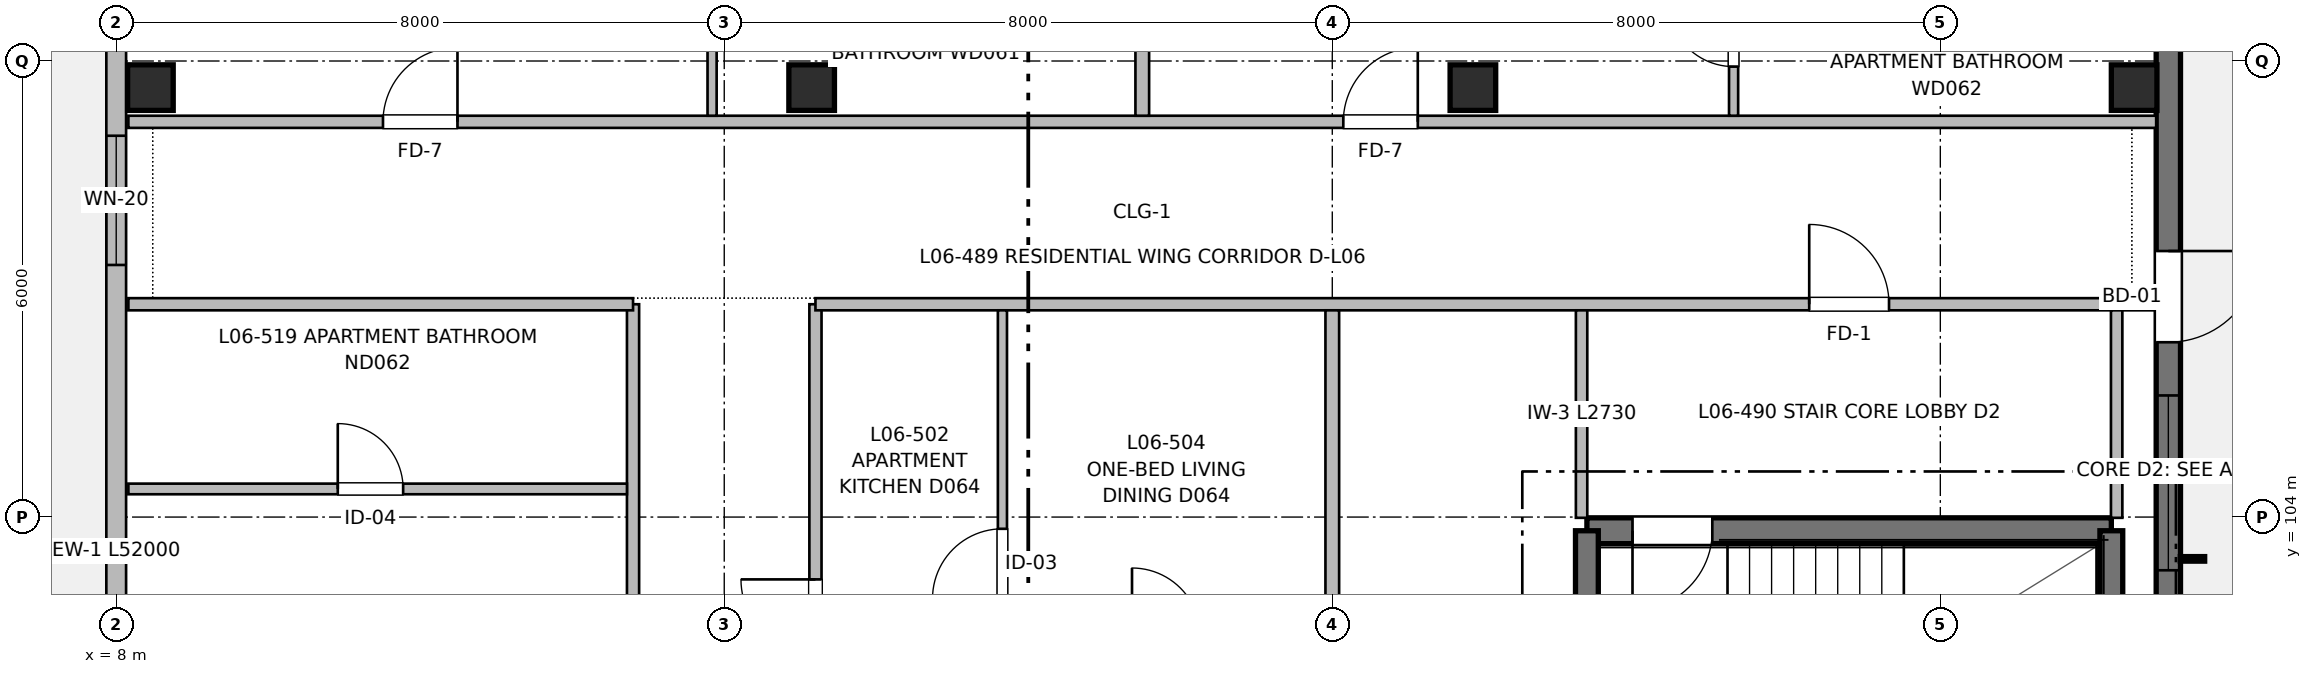
"""IFC4 building model, lengths in metres.
Left out: names, types, materials, properties, quantities, classifications, styles, units other than length and angle.
Written with IfcOpenShell. Run it as: python <this file> out.ifc"""

import sys

from ifc_helpers import new_model, si_unit, direction, frame, frame_2d, origin, origin_2d, place, context, subcontext, project, spatial, rectangle, extrude, element, fill, save


model = new_model("IFC4")
c1 = context("Model", 3, precision=1e-05, world=origin(), true_north=direction((0.0, 1.0)))
c2 = subcontext(c1, "Body", "Model", "MODEL_VIEW")
j1 = project(units=[si_unit("LENGTHUNIT", "METRE"), si_unit("PLANEANGLEUNIT", "RADIAN")], contexts=[c1])
p1 = place(None, origin())
s1 = spatial("IfcSite", under=j1, at=p1, CompositionType="ELEMENT")
p2 = place(p1, origin())
s2 = spatial("IfcBuilding", under=s1, at=p2, CompositionType="ELEMENT")
p3 = place(p2, frame((0.0, 0.0, 20.16)))
s3 = spatial("IfcBuildingStorey", under=s2, at=p3, CompositionType="ELEMENT", Elevation=20.16)
for number, where, z_axis, x_axis in (
    (1, (8.45, 109.65, 0.0), (0.0, 0.0, 1.0), (1.0, 0.0, 0.0)),
    (2, (17.15, 109.65, 0.0), (0.0, 0.0, 1.0), (1.0, 0.0, 0.0)),
    (3, (25.85, 109.65, 0.0), (0.0, 0.0, 1.0), (1.0, 0.0, 0.0)),
    (4, (34.55, 109.65, 0.0), (0.0, 0.0, 1.0), (1.0, 0.0, 0.0)),
):
    element("IfcColumn", number, at=place(p3, frame(where, z_axis=z_axis, x_axis=x_axis)), inside=s3, PredefinedType="COLUMN", context=c2, shape_type="SweptSolid", body=[
        extrude(rectangle(XDim=0.6, YDim=0.6, at=origin_2d()), origin(), (0.0, 0.0, 1.0), 3.2),
    ])
p4 = place(p3, frame((34.25, 103.82, 0.0), z_axis=(0.0, 0.0, 1.0), x_axis=(-1.0, 0.0, 0.0)))
e5 = element("IfcWall", 5, at=p4, inside=s3, PredefinedType="SHEAR", context=c2, shape_type="SweptSolid", body=[
    extrude(rectangle(XDim=6.9, YDim=0.34, at=frame_2d((3.45, 0.0))), origin(), (0.0, 0.0, 1.0), 3.2),
])
p5 = place(p4, frame((5.25, 0.0, 0.0)))
e6 = element("IfcOpeningElement", 6, at=p5, cuts=e5, PredefinedType="OPENING", context=c2, shape_type="SweptSolid", body=[
    extrude(rectangle(XDim=1.05, YDim=2.15, at=frame_2d((0.525, 1.075))), frame((0.0, 0.18, 0.0), z_axis=(0.0, -1.0, 0.0), x_axis=(1.0, 0.0, 0.0)), (0.0, 0.0, 1.0), 0.36),
])
for number, where, z_axis, x_axis in (
    (7, (27.35, 103.82, 0.0), (0.0, 0.0, 1.0), (0.0, -1.0, 0.0)),
    (8, (34.25, 100.45, 0.0), (0.0, 0.0, 1.0), (0.0, 1.0, 0.0)),
):
    element("IfcWall", number, at=place(p3, frame(where, z_axis=z_axis, x_axis=x_axis)), inside=s3, PredefinedType="SHEAR", context=c2, shape_type="SweptSolid", body=[
        extrude(rectangle(XDim=3.37, YDim=0.3, at=frame_2d((1.685, 0.0))), origin(), (0.0, 0.0, 1.0), 3.2),
    ])
p6 = place(p3, frame((35.0, 113.8, 0.0), z_axis=(0.0, 0.0, 1.0), x_axis=(0.0, -1.0, 0.0)))
e9 = element("IfcWall", 9, at=p6, inside=s3, PredefinedType="SHEAR", context=c2, shape_type="SweptSolid", body=[
    extrude(rectangle(XDim=13.8, YDim=0.32, at=frame_2d((6.9, 0.0))), origin(), (0.0, 0.0, 1.0), 2.98),
])
p7 = place(p6, frame((6.3, 0.0, 0.0)))
e10 = element("IfcOpeningElement", 10, at=p7, cuts=e9, PredefinedType="OPENING", context=c2, shape_type="SweptSolid", body=[
    extrude(rectangle(XDim=1.2, YDim=2.2, at=frame_2d((0.6, 1.1))), frame((0.0, 0.17, 0.0), z_axis=(0.0, -1.0, 0.0), x_axis=(1.0, 0.0, 0.0)), (0.0, 0.0, 1.0), 0.34),
])
p8 = place(p6, frame((8.2, 0.0, 0.57)))
e11 = element("IfcOpeningElement", 11, at=p8, cuts=e9, PredefinedType="OPENING", context=c2, shape_type="SweptSolid", body=[
    extrude(rectangle(XDim=2.3, YDim=1.65, at=frame_2d((1.15, 0.825))), frame((0.0, 0.17, 0.0), z_axis=(0.0, -1.0, 0.0), x_axis=(1.0, 0.0, 0.0)), (0.0, 0.0, 1.0), 0.34),
])
p9 = place(p3, frame((8.0, 61.8, 0.0), z_axis=(0.0, 0.0, 1.0), x_axis=(0.0, 1.0, 0.0)))
e12 = element("IfcWall", 12, at=p9, inside=s3, PredefinedType="SOLIDWALL", context=c2, shape_type="SweptSolid", body=[
    extrude(rectangle(XDim=52.0, YDim=0.26, at=frame_2d((26.0, 0.0))), origin(), (0.0, 0.0, 1.0), 2.98),
])
p10 = place(p9, frame((3.283, 0.0, 0.0)))
e13 = element("IfcOpeningElement", 13, at=p10, cuts=e12, PredefinedType="OPENING", context=c2, shape_type="SweptSolid", body=[
    extrude(rectangle(XDim=1.2, YDim=2.2, at=frame_2d((0.6, 1.1))), frame((0.0, 0.14, 0.0), z_axis=(0.0, -1.0, 0.0), x_axis=(1.0, 0.0, 0.0)), (0.0, 0.0, 1.0), 0.28),
])
p11 = place(p9, frame((6.083, 0.0, 0.57)))
e14 = element("IfcOpeningElement", 14, at=p11, cuts=e12, PredefinedType="OPENING", context=c2, shape_type="SweptSolid", body=[
    extrude(rectangle(XDim=2.3, YDim=1.65, at=frame_2d((1.15, 0.825))), frame((0.0, 0.14, 0.0), z_axis=(0.0, -1.0, 0.0), x_axis=(1.0, 0.0, 0.0)), (0.0, 0.0, 1.0), 0.28),
])
p12 = place(p9, frame((12.85, 0.0, 0.9)))
e15 = element("IfcOpeningElement", 15, at=p12, cuts=e12, PredefinedType="OPENING", context=c2, shape_type="SweptSolid", body=[
    extrude(rectangle(XDim=1.2, YDim=1.05, at=frame_2d((0.6, 0.525))), frame((0.0, 0.14, 0.0), z_axis=(0.0, -1.0, 0.0), x_axis=(1.0, 0.0, 0.0)), (0.0, 0.0, 1.0), 0.28),
])
p13 = place(p9, frame((21.342, 0.0, 0.9)))
e16 = element("IfcOpeningElement", 16, at=p13, cuts=e12, PredefinedType="OPENING", context=c2, shape_type="SweptSolid", body=[
    extrude(rectangle(XDim=0.65, YDim=0.95, at=frame_2d((0.325, 0.475))), frame((0.0, 0.14, 0.0), z_axis=(0.0, -1.0, 0.0), x_axis=(1.0, 0.0, 0.0)), (0.0, 0.0, 1.0), 0.28),
])
p14 = place(p9, frame((29.333, 0.0, 0.62)))
e17 = element("IfcOpeningElement", 17, at=p14, cuts=e12, PredefinedType="OPENING", context=c2, shape_type="SweptSolid", body=[
    extrude(rectangle(XDim=1.1, YDim=1.6, at=frame_2d((0.55, 0.8))), frame((0.0, 0.14, 0.0), z_axis=(0.0, -1.0, 0.0), x_axis=(1.0, 0.0, 0.0)), (0.0, 0.0, 1.0), 0.28),
])
p15 = place(p9, frame((35.3, 0.0, 0.47)))
e18 = element("IfcOpeningElement", 18, at=p15, cuts=e12, PredefinedType="OPENING", context=c2, shape_type="SweptSolid", body=[
    extrude(rectangle(XDim=2.7, YDim=1.75, at=frame_2d((1.35, 0.875))), frame((0.0, 0.14, 0.0), z_axis=(0.0, -1.0, 0.0), x_axis=(1.0, 0.0, 0.0)), (0.0, 0.0, 1.0), 0.28),
])
p16 = place(p9, frame((45.517, 0.0, 0.72)))
e19 = element("IfcOpeningElement", 19, at=p16, cuts=e12, PredefinedType="OPENING", context=c2, shape_type="SweptSolid", body=[
    extrude(rectangle(XDim=1.7, YDim=1.5, at=frame_2d((0.85, 0.75))), frame((0.0, 0.14, 0.0), z_axis=(0.0, -1.0, 0.0), x_axis=(1.0, 0.0, 0.0)), (0.0, 0.0, 1.0), 0.28),
])
p17 = place(p3, frame((14.8, 61.96, 0.0), z_axis=(0.0, 0.0, 1.0), x_axis=(0.0, 1.0, 0.0)))
e20 = element("IfcWall", 20, at=p17, inside=s3, PredefinedType="PARTITIONING", context=c2, shape_type="SweptSolid", body=[
    extrude(rectangle(XDim=44.84, YDim=0.16, at=frame_2d((22.42, 0.0))), origin(), (0.0, 0.0, 1.0), 2.935),
])
p18 = place(p17, frame((7.04, 0.0, 0.0)))
e21 = element("IfcOpeningElement", 21, at=p18, cuts=e20, PredefinedType="OPENING", context=c2, shape_type="SweptSolid", body=[
    extrude(rectangle(XDim=1.1, YDim=2.15, at=frame_2d((0.55, 1.075))), frame((0.0, 0.09, 0.0), z_axis=(0.0, -1.0, 0.0), x_axis=(1.0, 0.0, 0.0)), (0.0, 0.0, 1.0), 0.18),
])
p19 = place(p17, frame((13.44, 0.0, 0.0)))
e22 = element("IfcOpeningElement", 22, at=p19, cuts=e20, PredefinedType="OPENING", context=c2, shape_type="SweptSolid", body=[
    extrude(rectangle(XDim=1.6, YDim=2.15, at=frame_2d((0.8, 1.075))), frame((0.0, 0.09, 0.0), z_axis=(0.0, -1.0, 0.0), x_axis=(1.0, 0.0, 0.0)), (0.0, 0.0, 1.0), 0.18),
])
p20 = place(p17, frame((3.0, 0.0, 0.0)))
e23 = element("IfcOpeningElement", 23, at=p20, cuts=e20, PredefinedType="OPENING", context=c2, shape_type="SweptSolid", body=[
    extrude(rectangle(XDim=0.96, YDim=2.15, at=frame_2d((0.48, 1.075))), frame((0.0, 0.09, 0.0), z_axis=(0.0, -1.0, 0.0), x_axis=(1.0, 0.0, 0.0)), (0.0, 0.0, 1.0), 0.18),
])
p21 = place(p17, frame((27.045, 0.0, 0.0)))
e24 = element("IfcOpeningElement", 24, at=p21, cuts=e20, PredefinedType="OPENING", context=c2, shape_type="SweptSolid", body=[
    extrude(rectangle(XDim=0.98, YDim=2.15, at=frame_2d((0.49, 1.075))), frame((0.0, 0.09, 0.0), z_axis=(0.0, -1.0, 0.0), x_axis=(1.0, 0.0, 0.0)), (0.0, 0.0, 1.0), 0.18),
])
p22 = place(p17, frame((34.855, 0.0, 0.0)))
e25 = element("IfcOpeningElement", 25, at=p22, cuts=e20, PredefinedType="OPENING", context=c2, shape_type="SweptSolid", body=[
    extrude(rectangle(XDim=0.98, YDim=2.15, at=frame_2d((0.49, 1.075))), frame((0.0, 0.09, 0.0), z_axis=(0.0, -1.0, 0.0), x_axis=(1.0, 0.0, 0.0)), (0.0, 0.0, 1.0), 0.18),
])
p23 = place(p3, frame((17.2, 61.96, 0.0), z_axis=(0.0, 0.0, 1.0), x_axis=(0.0, 1.0, 0.0)))
e26 = element("IfcWall", 26, at=p23, inside=s3, PredefinedType="PARTITIONING", context=c2, shape_type="SweptSolid", body=[
    extrude(rectangle(XDim=44.84, YDim=0.16, at=frame_2d((22.42, 0.0))), origin(), (0.0, 0.0, 1.0), 2.935),
])
p24 = place(p23, frame((4.575, 0.0, 0.0)))
e27 = element("IfcOpeningElement", 27, at=p24, cuts=e26, PredefinedType="OPENING", context=c2, shape_type="SweptSolid", body=[
    extrude(rectangle(XDim=1.5, YDim=2.2, at=frame_2d((0.75, 1.1))), frame((0.0, 0.09, 0.0), z_axis=(0.0, -1.0, 0.0), x_axis=(1.0, 0.0, 0.0)), (0.0, 0.0, 1.0), 0.18),
])
p25 = place(p23, frame((17.27, 0.0, 0.0)))
e28 = element("IfcOpeningElement", 28, at=p25, cuts=e26, PredefinedType="OPENING", context=c2, shape_type="SweptSolid", body=[
    extrude(rectangle(XDim=0.98, YDim=2.15, at=frame_2d((0.49, 1.075))), frame((0.0, 0.09, 0.0), z_axis=(0.0, -1.0, 0.0), x_axis=(1.0, 0.0, 0.0)), (0.0, 0.0, 1.0), 0.18),
])
p26 = place(p23, frame((29.39, 0.0, 0.0)))
e29 = element("IfcOpeningElement", 29, at=p26, cuts=e26, PredefinedType="OPENING", context=c2, shape_type="SweptSolid", body=[
    extrude(rectangle(XDim=0.98, YDim=2.15, at=frame_2d((0.49, 1.075))), frame((0.0, 0.09, 0.0), z_axis=(0.0, -1.0, 0.0), x_axis=(1.0, 0.0, 0.0)), (0.0, 0.0, 1.0), 0.18),
])
p27 = place(p23, frame((40.24, 0.0, 0.0)))
e30 = element("IfcOpeningElement", 30, at=p27, cuts=e26, PredefinedType="OPENING", context=c2, shape_type="SweptSolid", body=[
    extrude(rectangle(XDim=0.98, YDim=2.15, at=frame_2d((0.49, 1.075))), frame((0.0, 0.09, 0.0), z_axis=(0.0, -1.0, 0.0), x_axis=(1.0, 0.0, 0.0)), (0.0, 0.0, 1.0), 0.18),
])
p28 = place(p3, frame((8.16, 106.8, 0.0), z_axis=(0.0, 0.0, 1.0), x_axis=(1.0, 0.0, 0.0)))
e31 = element("IfcWall", 31, at=p28, inside=s3, PredefinedType="PARTITIONING", context=c2, shape_type="SweptSolid", body=[
    extrude(rectangle(XDim=6.64, YDim=0.16, at=frame_2d((3.32, 0.0))), origin(), (0.0, 0.0, 1.0), 2.935),
])
p29 = place(p3, frame((17.2, 106.8, 0.0), z_axis=(0.0, 0.0, 1.0), x_axis=(1.0, 0.0, 0.0)))
e32 = element("IfcWall", 32, at=p29, inside=s3, PredefinedType="PARTITIONING", context=c2, shape_type="SweptSolid", body=[
    extrude(rectangle(XDim=17.64, YDim=0.16, at=frame_2d((8.82, 0.0))), origin(), (0.0, 0.0, 1.0), 2.935),
])
p30 = place(p29, frame((13.075, 0.0, 0.0)))
e33 = element("IfcOpeningElement", 33, at=p30, cuts=e32, PredefinedType="OPENING", context=c2, shape_type="SweptSolid", body=[
    extrude(rectangle(XDim=1.05, YDim=2.15, at=frame_2d((0.525, 1.075))), frame((0.0, 0.09, 0.0), z_axis=(0.0, -1.0, 0.0), x_axis=(1.0, 0.0, 0.0)), (0.0, 0.0, 1.0), 0.18),
])
p31 = place(p3, frame((8.16, 109.2, 0.0), z_axis=(0.0, 0.0, 1.0), x_axis=(1.0, 0.0, 0.0)))
e34 = element("IfcWall", 34, at=p31, inside=s3, PredefinedType="PARTITIONING", context=c2, shape_type="SweptSolid", body=[
    extrude(rectangle(XDim=26.68, YDim=0.16, at=frame_2d((13.34, 0.0))), origin(), (0.0, 0.0, 1.0), 2.935),
])
p32 = place(p31, frame((3.35, 0.0, 0.0)))
e35 = element("IfcOpeningElement", 35, at=p32, cuts=e34, PredefinedType="OPENING", context=c2, shape_type="SweptSolid", body=[
    extrude(rectangle(XDim=0.98, YDim=2.15, at=frame_2d((0.49, 1.075))), frame((0.0, 0.09, 0.0), z_axis=(0.0, -1.0, 0.0), x_axis=(1.0, 0.0, 0.0)), (0.0, 0.0, 1.0), 0.18),
])
p33 = place(p31, frame((15.985, 0.0, 0.0)))
e36 = element("IfcOpeningElement", 36, at=p33, cuts=e34, PredefinedType="OPENING", context=c2, shape_type="SweptSolid", body=[
    extrude(rectangle(XDim=0.98, YDim=2.15, at=frame_2d((0.49, 1.075))), frame((0.0, 0.09, 0.0), z_axis=(0.0, -1.0, 0.0), x_axis=(1.0, 0.0, 0.0)), (0.0, 0.0, 1.0), 0.18),
])
p34 = place(p3, frame((24.0, 100.05, 0.0), z_axis=(0.0, 0.0, 1.0), x_axis=(0.0, 1.0, 0.0)))
e37 = element("IfcWall", 37, at=p34, inside=s3, PredefinedType="PARTITIONING", context=c2, shape_type="SweptSolid", body=[
    extrude(rectangle(XDim=6.67, YDim=0.18, at=frame_2d((3.335, 0.0))), origin(), (0.0, 0.0, 1.0), 2.935),
])
for number, where, z_axis, x_axis in (
    (38, (27.28, 103.99, 0.0), (0.0, 0.0, 1.0), (0.0, 1.0, 0.0)),
    (39, (34.32, 103.99, 0.0), (0.0, 0.0, 1.0), (0.0, 1.0, 0.0)),
):
    element("IfcWall", number, at=place(p3, frame(where, z_axis=z_axis, x_axis=x_axis)), inside=s3, PredefinedType="PARTITIONING", context=c2, shape_type="SweptSolid", body=[
        extrude(rectangle(XDim=2.73, YDim=0.15, at=frame_2d((1.365, 0.0))), origin(), (0.0, 0.0, 1.0), 2.935),
    ])
p35 = place(p3, frame((19.66, 96.96, 0.0), z_axis=(0.0, 0.0, 1.0), x_axis=(0.0, 1.0, 0.0)))
e40 = element("IfcWall", 40, at=p35, inside=s3, PredefinedType="PARTITIONING", context=c2, shape_type="SweptSolid", body=[
    extrude(rectangle(XDim=9.76, YDim=0.12, at=frame_2d((4.88, 0.0))), origin(), (0.0, 0.0, 1.0), 2.935),
])
p36 = place(p35, frame((1.706, 0.0, 0.0)))
e41 = element("IfcOpeningElement", 41, at=p36, cuts=e40, PredefinedType="OPENING", context=c2, shape_type="SweptSolid", body=[
    extrude(rectangle(XDim=0.86, YDim=2.1, at=frame_2d((0.43, 1.05))), frame((0.0, 0.07, 0.0), z_axis=(0.0, -1.0, 0.0), x_axis=(1.0, 0.0, 0.0)), (0.0, 0.0, 1.0), 0.14),
])
p37 = place(p35, frame((5.966, 0.0, 0.0)))
e42 = element("IfcOpeningElement", 42, at=p37, cuts=e40, PredefinedType="OPENING", context=c2, shape_type="SweptSolid", body=[
    extrude(rectangle(XDim=0.92, YDim=2.1, at=frame_2d((0.46, 1.05))), frame((0.0, 0.07, 0.0), z_axis=(0.0, -1.0, 0.0), x_axis=(1.0, 0.0, 0.0)), (0.0, 0.0, 1.0), 0.14),
])
p38 = place(p3, frame((21.5, 109.28, 0.0), z_axis=(0.0, 0.0, 1.0), x_axis=(0.0, 1.0, 0.0)))
e43 = element("IfcWall", 43, at=p38, inside=s3, PredefinedType="PARTITIONING", context=c2, shape_type="SweptSolid", body=[
    extrude(rectangle(XDim=4.39, YDim=0.18, at=frame_2d((2.195, 0.0))), origin(), (0.0, 0.0, 1.0), 2.935),
])
p39 = place(p3, frame((15.84, 109.28, 0.0), z_axis=(0.0, 0.0, 1.0), x_axis=(0.0, 1.0, 0.0)))
e44 = element("IfcWall", 44, at=p39, inside=s3, PredefinedType="PARTITIONING", context=c2, shape_type="SweptSolid", body=[
    extrude(rectangle(XDim=4.39, YDim=0.12, at=frame_2d((2.195, 0.0))), origin(), (0.0, 0.0, 1.0), 2.935),
])
p40 = place(p39, frame((2.296, 0.0, 0.0)))
e45 = element("IfcOpeningElement", 45, at=p40, cuts=e44, PredefinedType="OPENING", context=c2, shape_type="SweptSolid", body=[
    extrude(rectangle(XDim=0.86, YDim=2.1, at=frame_2d((0.43, 1.05))), frame((0.0, 0.07, 0.0), z_axis=(0.0, -1.0, 0.0), x_axis=(1.0, 0.0, 0.0)), (0.0, 0.0, 1.0), 0.14),
])
p41 = place(p3, frame((29.28, 109.28, 0.0), z_axis=(0.0, 0.0, 1.0), x_axis=(0.0, 1.0, 0.0)))
e46 = element("IfcWall", 46, at=p41, inside=s3, PredefinedType="PARTITIONING", context=c2, shape_type="SweptSolid", body=[
    extrude(rectangle(XDim=4.39, YDim=0.12, at=frame_2d((2.195, 0.0))), origin(), (0.0, 0.0, 1.0), 2.935),
])
p42 = place(p41, frame((0.646, 0.0, 0.0)))
e47 = element("IfcOpeningElement", 47, at=p42, cuts=e46, PredefinedType="OPENING", context=c2, shape_type="SweptSolid", body=[
    extrude(rectangle(XDim=0.86, YDim=2.1, at=frame_2d((0.43, 1.05))), frame((0.0, 0.07, 0.0), z_axis=(0.0, -1.0, 0.0), x_axis=(1.0, 0.0, 0.0)), (0.0, 0.0, 1.0), 0.14),
])
p43 = place(p41, frame((3.086, 0.0, 0.0)))
e48 = element("IfcOpeningElement", 48, at=p43, cuts=e46, PredefinedType="OPENING", context=c2, shape_type="SweptSolid", body=[
    extrude(rectangle(XDim=0.9, YDim=2.1, at=frame_2d((0.45, 1.05))), frame((0.0, 0.07, 0.0), z_axis=(0.0, -1.0, 0.0), x_axis=(1.0, 0.0, 0.0)), (0.0, 0.0, 1.0), 0.14),
])
p44 = place(p3, frame((8.16, 104.37, 0.0), z_axis=(0.0, 0.0, 1.0), x_axis=(1.0, 0.0, 0.0)))
e49 = element("IfcWall", 49, at=p44, inside=s3, PredefinedType="PARTITIONING", context=c2, shape_type="SweptSolid", body=[
    extrude(rectangle(XDim=6.56, YDim=0.14, at=frame_2d((3.28, 0.0))), origin(), (0.0, 0.0, 1.0), 2.935),
])
p45 = place(p44, frame((2.755, 0.0, 0.0)))
e50 = element("IfcOpeningElement", 50, at=p45, cuts=e49, PredefinedType="OPENING", context=c2, shape_type="SweptSolid", body=[
    extrude(rectangle(XDim=0.86, YDim=2.1, at=frame_2d((0.43, 1.05))), frame((0.0, 0.08, 0.0), z_axis=(0.0, -1.0, 0.0), x_axis=(1.0, 0.0, 0.0)), (0.0, 0.0, 1.0), 0.16),
])
p46 = place(p5, origin())
e51 = element("IfcDoor", 51, at=p46, inside=s3, OperationType="SINGLE_SWING_RIGHT", PredefinedType="DOOR", context=c2, shape_type="SweptSolid", body=[
    extrude(rectangle(XDim=1.05, YDim=2.15, at=frame_2d((0.525, 1.075))), frame((0.0, 0.025, 0.0), z_axis=(0.0, -1.0, 0.0), x_axis=(1.0, 0.0, 0.0)), (0.0, 0.0, 1.0), 0.05),
])
fill(e6, e51)
p47 = place(p7, origin())
e52 = element("IfcDoor", 52, at=p47, inside=s3, OperationType="SINGLE_SWING_LEFT", PredefinedType="DOOR", context=c2, shape_type="SweptSolid", body=[
    extrude(rectangle(XDim=1.2, YDim=2.2, at=frame_2d((0.6, 1.1))), frame((0.0, 0.025, 0.0), z_axis=(0.0, -1.0, 0.0), x_axis=(1.0, 0.0, 0.0)), (0.0, 0.0, 1.0), 0.05),
])
fill(e10, e52)
p48 = place(p8, origin())
e53 = element("IfcWindow", 53, at=p48, inside=s3, PartitioningType="SINGLE_PANEL", PredefinedType="WINDOW", context=c2, shape_type="SweptSolid", body=[
    extrude(rectangle(XDim=2.3, YDim=1.65, at=frame_2d((1.15, 0.825))), frame((0.0, 0.03, 0.0), z_axis=(0.0, -1.0, 0.0), x_axis=(1.0, 0.0, 0.0)), (0.0, 0.0, 1.0), 0.06),
])
fill(e11, e53)
p49 = place(p16, origin())
e54 = element("IfcWindow", 54, at=p49, inside=s3, PartitioningType="SINGLE_PANEL", PredefinedType="WINDOW", context=c2, shape_type="SweptSolid", body=[
    extrude(rectangle(XDim=1.7, YDim=1.5, at=frame_2d((0.85, 0.75))), frame((0.0, 0.03, 0.0), z_axis=(0.0, -1.0, 0.0), x_axis=(1.0, 0.0, 0.0)), (0.0, 0.0, 1.0), 0.06),
])
fill(e19, e54)
p50 = place(p30, origin())
e55 = element("IfcDoor", 55, at=p50, inside=s3, OperationType="SINGLE_SWING_LEFT", PredefinedType="DOOR", context=c2, shape_type="SweptSolid", body=[
    extrude(rectangle(XDim=1.05, YDim=2.15, at=frame_2d((0.525, 1.075))), frame((0.0, 0.025, 0.0), z_axis=(0.0, -1.0, 0.0), x_axis=(1.0, 0.0, 0.0)), (0.0, 0.0, 1.0), 0.05),
])
fill(e33, e55)
p51 = place(p37, origin())
e56 = element("IfcDoor", 56, at=p51, inside=s3, OperationType="SINGLE_SWING_LEFT", PredefinedType="DOOR", context=c2, shape_type="SweptSolid", body=[
    extrude(rectangle(XDim=0.92, YDim=2.1, at=frame_2d((0.46, 1.05))), frame((0.0, 0.025, 0.0), z_axis=(0.0, -1.0, 0.0), x_axis=(1.0, 0.0, 0.0)), (0.0, 0.0, 1.0), 0.05),
])
fill(e42, e56)
p52 = place(p27, origin())
e57 = element("IfcDoor", 57, at=p52, inside=s3, OperationType="SINGLE_SWING_RIGHT", PredefinedType="DOOR", context=c2, shape_type="SweptSolid", body=[
    extrude(rectangle(XDim=0.98, YDim=2.15, at=frame_2d((0.49, 1.075))), frame((0.0, 0.025, 0.0), z_axis=(0.0, -1.0, 0.0), x_axis=(1.0, 0.0, 0.0)), (0.0, 0.0, 1.0), 0.05),
])
fill(e30, e57)
p53 = place(p32, origin())
e58 = element("IfcDoor", 58, at=p53, inside=s3, OperationType="SINGLE_SWING_RIGHT", PredefinedType="DOOR", context=c2, shape_type="SweptSolid", body=[
    extrude(rectangle(XDim=0.98, YDim=2.15, at=frame_2d((0.49, 1.075))), frame((0.0, 0.025, 0.0), z_axis=(0.0, -1.0, 0.0), x_axis=(1.0, 0.0, 0.0)), (0.0, 0.0, 1.0), 0.05),
])
fill(e35, e58)
p54 = place(p33, origin())
e59 = element("IfcDoor", 59, at=p54, inside=s3, OperationType="SINGLE_SWING_RIGHT", PredefinedType="DOOR", context=c2, shape_type="SweptSolid", body=[
    extrude(rectangle(XDim=0.98, YDim=2.15, at=frame_2d((0.49, 1.075))), frame((0.0, 0.025, 0.0), z_axis=(0.0, -1.0, 0.0), x_axis=(1.0, 0.0, 0.0)), (0.0, 0.0, 1.0), 0.05),
])
fill(e36, e59)
p55 = place(p42, origin())
e60 = element("IfcDoor", 60, at=p55, inside=s3, OperationType="SINGLE_SWING_RIGHT", PredefinedType="DOOR", context=c2, shape_type="SweptSolid", body=[
    extrude(rectangle(XDim=0.86, YDim=2.1, at=frame_2d((0.43, 1.05))), frame((0.0, 0.025, 0.0), z_axis=(0.0, -1.0, 0.0), x_axis=(1.0, 0.0, 0.0)), (0.0, 0.0, 1.0), 0.05),
])
fill(e47, e60)
p56 = place(p45, origin())
e61 = element("IfcDoor", 61, at=p56, inside=s3, OperationType="SINGLE_SWING_LEFT", PredefinedType="DOOR", context=c2, shape_type="SweptSolid", body=[
    extrude(rectangle(XDim=0.86, YDim=2.1, at=frame_2d((0.43, 1.05))), frame((0.0, 0.025, 0.0), z_axis=(0.0, -1.0, 0.0), x_axis=(1.0, 0.0, 0.0)), (0.0, 0.0, 1.0), 0.05),
])
fill(e50, e61)
save(model, sys.argv[1])
